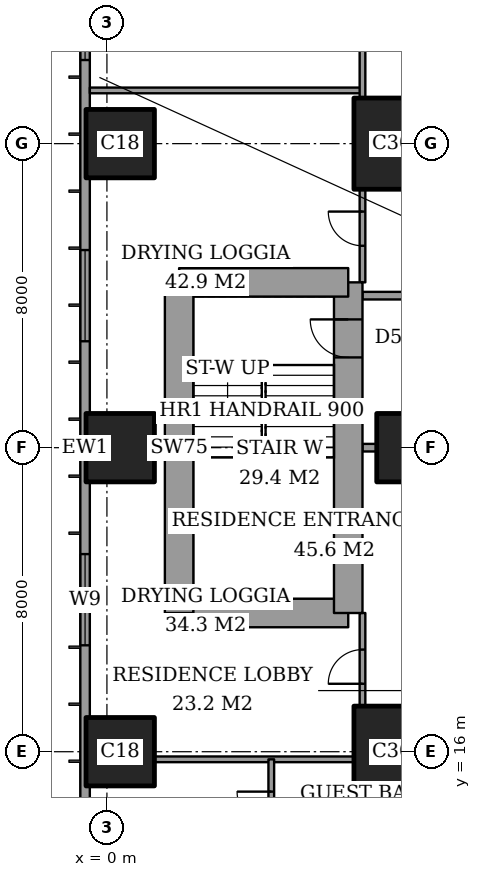
"""IFC4 building model, lengths in metres.
Left out: names, types, materials, properties, quantities, classifications, styles, units other than length and angle.
Written with IfcOpenShell. Run it as: python <this file> out.ifc"""

import sys

from ifc_helpers import new_model, si_unit, direction, frame, frame_2d, origin, origin_2d, place, context, subcontext, project, spatial, rectangle, extrude, element, fill, save


model = new_model("IFC4")
c1 = context("Model", 3, precision=1e-05, world=origin(), true_north=direction((0.0, 1.0)))
c2 = subcontext(c1, "Body", "Model", "MODEL_VIEW")
j1 = project(units=[si_unit("LENGTHUNIT", "METRE"), si_unit("PLANEANGLEUNIT", "RADIAN")], contexts=[c1])
p1 = place(None, origin())
s1 = spatial("IfcSite", under=j1, at=p1, CompositionType="ELEMENT")
p2 = place(p1, origin())
s2 = spatial("IfcBuilding", under=s1, at=p2, CompositionType="ELEMENT")
p3 = place(p2, frame((0.0, 0.0, 211.0)))
s3 = spatial("IfcBuildingStorey", under=s2, at=p3, CompositionType="ELEMENT", Elevation=211.0)
for number, where, z_axis, x_axis in (
    (1, (0.35, 16.0, 0.0), (0.0, 0.0, 1.0), (1.0, 0.0, 0.0)),
    (2, (0.35, 24.0, 0.0), (0.0, 0.0, 1.0), (1.0, 0.0, 0.0)),
    (3, (0.35, 32.0, 0.0), (0.0, 0.0, 1.0), (1.0, 0.0, 0.0)),
):
    element("IfcColumn", number, at=place(p3, frame(where, z_axis=z_axis, x_axis=x_axis)), inside=s3, PredefinedType="COLUMN", context=c2, shape_type="SweptSolid", body=[
        extrude(rectangle(XDim=1.8, YDim=1.8, at=origin_2d()), origin(), (0.0, 0.0, 1.0), 3.6),
    ])
p4 = place(p3, frame((8.0, 16.0, 0.0), z_axis=(0.0, 0.0, 1.0), x_axis=(1.0, 0.0, 0.0)))
e4 = element("IfcColumn", 4, at=p4, inside=s3, PredefinedType="COLUMN", context=c2, shape_type="SweptSolid", body=[
    extrude(rectangle(XDim=3.0, YDim=2.4, at=origin_2d()), origin(), (0.0, 0.0, 1.0), 3.6),
])
p5 = place(p3, frame((8.0, 24.0, 0.0), z_axis=(0.0, 0.0, 1.0), x_axis=(1.0, 0.0, 0.0)))
e5 = element("IfcColumn", 5, at=p5, inside=s3, PredefinedType="COLUMN", context=c2, shape_type="SweptSolid", body=[
    extrude(rectangle(XDim=1.8, YDim=1.8, at=origin_2d()), origin(), (0.0, 0.0, 1.0), 3.6),
])
p6 = place(p3, frame((8.0, 32.0, 0.0), z_axis=(0.0, 0.0, 1.0), x_axis=(1.0, 0.0, 0.0)))
e6 = element("IfcColumn", 6, at=p6, inside=s3, PredefinedType="COLUMN", context=c2, shape_type="SweptSolid", body=[
    extrude(rectangle(XDim=3.0, YDim=2.4, at=origin_2d()), origin(), (0.0, 0.0, 1.0), 3.6),
])
p7 = place(p3, frame((1.9, 19.65, 0.0), z_axis=(0.0, 0.0, 1.0), x_axis=(1.0, 0.0, 0.0)))
e7 = element("IfcWall", 7, at=p7, inside=s3, PredefinedType="SHEAR", context=c2, shape_type="SweptSolid", body=[
    extrude(rectangle(XDim=4.45, YDim=0.75, at=frame_2d((2.225, 0.0))), origin(), (0.0, 0.0, 1.0), 3.6),
])
p8 = place(p3, frame((6.35, 19.65, 0.0), z_axis=(0.0, 0.0, 1.0), x_axis=(0.0, 1.0, 0.0)))
e8 = element("IfcWall", 8, at=p8, inside=s3, PredefinedType="SHEAR", context=c2, shape_type="SweptSolid", body=[
    extrude(rectangle(XDim=8.7, YDim=0.75, at=frame_2d((4.35, 0.0))), origin(), (0.0, 0.0, 1.0), 3.6),
])
p9 = place(p8, frame((6.725, 0.0, 0.0)))
e9 = element("IfcOpeningElement", 9, at=p9, cuts=e8, PredefinedType="OPENING", context=c2, shape_type="SweptSolid", body=[
    extrude(rectangle(XDim=1.0, YDim=2.1, at=frame_2d((0.5, 1.05))), frame((0.0, 0.385, 0.0), z_axis=(0.0, -1.0, 0.0), x_axis=(1.0, 0.0, 0.0)), (0.0, 0.0, 1.0), 0.77),
])
p10 = place(p3, frame((6.35, 28.35, 0.0), z_axis=(0.0, 0.0, 1.0), x_axis=(-1.0, 0.0, 0.0)))
e10 = element("IfcWall", 10, at=p10, inside=s3, PredefinedType="SHEAR", context=c2, shape_type="SweptSolid", body=[
    extrude(rectangle(XDim=4.45, YDim=0.75, at=frame_2d((2.225, 0.0))), origin(), (0.0, 0.0, 1.0), 3.6),
])
p11 = place(p3, frame((1.9, 28.35, 0.0), z_axis=(0.0, 0.0, 1.0), x_axis=(0.0, -1.0, 0.0)))
e11 = element("IfcWall", 11, at=p11, inside=s3, PredefinedType="SHEAR", context=c2, shape_type="SweptSolid", body=[
    extrude(rectangle(XDim=8.7, YDim=0.75, at=frame_2d((4.35, 0.0))), origin(), (0.0, 0.0, 1.0), 3.6),
])
p12 = place(p3, frame((-0.575, 44.825, 0.0), z_axis=(0.0, 0.0, 1.0), x_axis=(0.0, -1.0, 0.0)))
e12 = element("IfcWall", 12, at=p12, inside=s3, PredefinedType="SOLIDWALL", context=c2, shape_type="SweptSolid", body=[
    extrude(rectangle(XDim=41.65, YDim=0.25, at=frame_2d((20.825, 0.0))), origin(), (0.0, 0.0, 1.0), 3.6),
])
p13 = place(p12, frame((0.825, 0.0, 0.2)))
e13 = element("IfcOpeningElement", 13, at=p13, cuts=e12, PredefinedType="OPENING", context=c2, shape_type="SweptSolid", body=[
    extrude(rectangle(XDim=2.4, YDim=2.4, at=frame_2d((1.2, 1.2))), frame((0.0, 0.135, 0.0), z_axis=(0.0, -1.0, 0.0), x_axis=(1.0, 0.0, 0.0)), (0.0, 0.0, 1.0), 0.27),
])
p14 = place(p12, frame((6.05, 0.0, 0.2)))
e14 = element("IfcOpeningElement", 14, at=p14, cuts=e12, PredefinedType="OPENING", context=c2, shape_type="SweptSolid", body=[
    extrude(rectangle(XDim=1.2, YDim=2.4, at=frame_2d((0.6, 1.2))), frame((0.0, 0.135, 0.0), z_axis=(0.0, -1.0, 0.0), x_axis=(1.0, 0.0, 0.0)), (0.0, 0.0, 1.0), 0.27),
])
p15 = place(p12, frame((8.225, 0.0, 0.2)))
e15 = element("IfcOpeningElement", 15, at=p15, cuts=e12, PredefinedType="OPENING", context=c2, shape_type="SweptSolid", body=[
    extrude(rectangle(XDim=2.4, YDim=2.4, at=frame_2d((1.2, 1.2))), frame((0.0, 0.135, 0.0), z_axis=(0.0, -1.0, 0.0), x_axis=(1.0, 0.0, 0.0)), (0.0, 0.0, 1.0), 0.27),
])
p16 = place(p12, frame((15.625, 0.0, 0.2)))
e16 = element("IfcOpeningElement", 16, at=p16, cuts=e12, PredefinedType="OPENING", context=c2, shape_type="SweptSolid", body=[
    extrude(rectangle(XDim=2.4, YDim=2.4, at=frame_2d((1.2, 1.2))), frame((0.0, 0.135, 0.0), z_axis=(0.0, -1.0, 0.0), x_axis=(1.0, 0.0, 0.0)), (0.0, 0.0, 1.0), 0.27),
])
p17 = place(p12, frame((23.625, 0.0, 0.2)))
e17 = element("IfcOpeningElement", 17, at=p17, cuts=e12, PredefinedType="OPENING", context=c2, shape_type="SweptSolid", body=[
    extrude(rectangle(XDim=2.4, YDim=2.4, at=frame_2d((1.2, 1.2))), frame((0.0, 0.135, 0.0), z_axis=(0.0, -1.0, 0.0), x_axis=(1.0, 0.0, 0.0)), (0.0, 0.0, 1.0), 0.27),
])
p18 = place(p12, frame((30.775, 0.0, 0.2)))
e18 = element("IfcOpeningElement", 18, at=p18, cuts=e12, PredefinedType="OPENING", context=c2, shape_type="SweptSolid", body=[
    extrude(rectangle(XDim=2.4, YDim=2.4, at=frame_2d((1.2, 1.2))), frame((0.0, 0.135, 0.0), z_axis=(0.0, -1.0, 0.0), x_axis=(1.0, 0.0, 0.0)), (0.0, 0.0, 1.0), 0.27),
])
p19 = place(p12, frame((34.55, 0.0, 0.2)))
e19 = element("IfcOpeningElement", 19, at=p19, cuts=e12, PredefinedType="OPENING", context=c2, shape_type="SweptSolid", body=[
    extrude(rectangle(XDim=1.2, YDim=2.4, at=frame_2d((0.6, 1.2))), frame((0.0, 0.135, 0.0), z_axis=(0.0, -1.0, 0.0), x_axis=(1.0, 0.0, 0.0)), (0.0, 0.0, 1.0), 0.27),
])
p20 = place(p12, frame((38.425, 0.0, 0.2)))
e20 = element("IfcOpeningElement", 20, at=p20, cuts=e12, PredefinedType="OPENING", context=c2, shape_type="SweptSolid", body=[
    extrude(rectangle(XDim=2.4, YDim=2.4, at=frame_2d((1.2, 1.2))), frame((0.0, 0.135, 0.0), z_axis=(0.0, -1.0, 0.0), x_axis=(1.0, 0.0, 0.0)), (0.0, 0.0, 1.0), 0.27),
])
p21 = place(p3, frame((1.25, 15.8, 0.0), z_axis=(0.0, 0.0, 1.0), x_axis=(1.0, 0.0, 0.0)))
e21 = element("IfcWall", 21, at=p21, inside=s3, PredefinedType="PARTITIONING", context=c2, shape_type="SweptSolid", body=[
    extrude(rectangle(XDim=5.25, YDim=0.15, at=frame_2d((2.625, 0.0))), origin(), (0.0, 0.0, 1.0), 3.35),
])
p22 = place(p3, frame((6.725, 24.0, 0.0), z_axis=(0.0, 0.0, 1.0), x_axis=(1.0, 0.0, 0.0)))
e22 = element("IfcWall", 22, at=p22, inside=s3, PredefinedType="PARTITIONING", context=c2, shape_type="SweptSolid", body=[
    extrude(rectangle(XDim=0.375, YDim=0.2, at=frame_2d((0.188, 0.0))), origin(), (0.0, 0.0, 1.0), 3.35),
])
p23 = place(p3, frame((6.725, 28.0, 0.0), z_axis=(0.0, 0.0, 1.0), x_axis=(1.0, 0.0, 0.0)))
e23 = element("IfcWall", 23, at=p23, inside=s3, PredefinedType="PARTITIONING", context=c2, shape_type="SweptSolid", body=[
    extrude(rectangle(XDim=17.275, YDim=0.2, at=frame_2d((8.637, 0.0))), origin(), (0.0, 0.0, 1.0), 3.35),
])
p24 = place(p23, frame((6.775, 0.0, 0.0)))
e24 = element("IfcOpeningElement", 24, at=p24, cuts=e23, PredefinedType="OPENING", context=c2, shape_type="SweptSolid", body=[
    extrude(rectangle(XDim=1.2, YDim=2.4, at=frame_2d((0.6, 1.2))), frame((0.0, 0.11, 0.0), z_axis=(0.0, -1.0, 0.0), x_axis=(1.0, 0.0, 0.0)), (0.0, 0.0, 1.0), 0.22),
])
p25 = place(p3, frame((-0.45, 33.4, 0.0), z_axis=(0.0, 0.0, 1.0), x_axis=(1.0, 0.0, 0.0)))
e25 = element("IfcWall", 25, at=p25, inside=s3, PredefinedType="PARTITIONING", context=c2, shape_type="SweptSolid", body=[
    extrude(rectangle(XDim=7.175, YDim=0.15, at=frame_2d((3.587, 0.0))), origin(), (0.0, 0.0, 1.0), 3.35),
])
p26 = place(p3, frame((4.325, 13.2, 0.0), z_axis=(0.0, 0.0, 1.0), x_axis=(0.0, 1.0, 0.0)))
e26 = element("IfcWall", 26, at=p26, inside=s3, PredefinedType="PARTITIONING", context=c2, shape_type="SweptSolid", body=[
    extrude(rectangle(XDim=2.6, YDim=0.15, at=frame_2d((1.3, 0.0))), origin(), (0.0, 0.0, 1.0), 3.35),
])
p27 = place(p26, frame((0.85, 0.0, 0.0)))
e27 = element("IfcOpeningElement", 27, at=p27, cuts=e26, PredefinedType="OPENING", context=c2, shape_type="SweptSolid", body=[
    extrude(rectangle(XDim=0.9, YDim=2.1, at=frame_2d((0.45, 1.05))), frame((0.0, 0.085, 0.0), z_axis=(0.0, -1.0, 0.0), x_axis=(1.0, 0.0, 0.0)), (0.0, 0.0, 1.0), 0.17),
])
p28 = place(p3, frame((6.725, 10.6, 0.0), z_axis=(0.0, 0.0, 1.0), x_axis=(0.0, 1.0, 0.0)))
e28 = element("IfcWall", 28, at=p28, inside=s3, PredefinedType="PARTITIONING", context=c2, shape_type="SweptSolid", body=[
    extrude(rectangle(XDim=4.2, YDim=0.15, at=frame_2d((2.1, 0.0))), origin(), (0.0, 0.0, 1.0), 3.35),
])
p29 = place(p3, frame((6.725, 17.2, 0.0), z_axis=(0.0, 0.0, 1.0), x_axis=(0.0, 1.0, 0.0)))
e29 = element("IfcWall", 29, at=p29, inside=s3, PredefinedType="PARTITIONING", context=c2, shape_type="SweptSolid", body=[
    extrude(rectangle(XDim=2.45, YDim=0.15, at=frame_2d((1.225, 0.0))), origin(), (0.0, 0.0, 1.0), 3.35),
])
p30 = place(p29, frame((0.587, 0.0, 0.0)))
e30 = element("IfcOpeningElement", 30, at=p30, cuts=e29, PredefinedType="OPENING", context=c2, shape_type="SweptSolid", body=[
    extrude(rectangle(XDim=0.9, YDim=2.1, at=frame_2d((0.45, 1.05))), frame((0.0, 0.085, 0.0), z_axis=(0.0, -1.0, 0.0), x_axis=(1.0, 0.0, 0.0)), (0.0, 0.0, 1.0), 0.17),
])
p31 = place(p3, frame((6.725, 28.35, 0.0), z_axis=(0.0, 0.0, 1.0), x_axis=(0.0, 1.0, 0.0)))
e31 = element("IfcWall", 31, at=p31, inside=s3, PredefinedType="PARTITIONING", context=c2, shape_type="SweptSolid", body=[
    extrude(rectangle(XDim=2.45, YDim=0.15, at=frame_2d((1.225, 0.0))), origin(), (0.0, 0.0, 1.0), 3.35),
])
p32 = place(p31, frame((0.962, 0.0, 0.0)))
e32 = element("IfcOpeningElement", 32, at=p32, cuts=e31, PredefinedType="OPENING", context=c2, shape_type="SweptSolid", body=[
    extrude(rectangle(XDim=0.9, YDim=2.1, at=frame_2d((0.45, 1.05))), frame((0.0, 0.085, 0.0), z_axis=(0.0, -1.0, 0.0), x_axis=(1.0, 0.0, 0.0)), (0.0, 0.0, 1.0), 0.17),
])
p33 = place(p3, frame((6.725, 33.2, 0.0), z_axis=(0.0, 0.0, 1.0), x_axis=(0.0, 1.0, 0.0)))
e33 = element("IfcWall", 33, at=p33, inside=s3, PredefinedType="PARTITIONING", context=c2, shape_type="SweptSolid", body=[
    extrude(rectangle(XDim=4.2, YDim=0.15, at=frame_2d((2.1, 0.0))), origin(), (0.0, 0.0, 1.0), 3.35),
])
p34 = place(p15, origin())
e34 = element("IfcWindow", 34, at=p34, inside=s3, PartitioningType="SINGLE_PANEL", PredefinedType="WINDOW", context=c2, shape_type="SweptSolid", body=[
    extrude(rectangle(XDim=2.4, YDim=2.4, at=frame_2d((1.2, 1.2))), frame((0.0, 0.03, 0.0), z_axis=(0.0, -1.0, 0.0), x_axis=(1.0, 0.0, 0.0)), (0.0, 0.0, 1.0), 0.06),
])
fill(e15, e34)
p35 = place(p16, origin())
e35 = element("IfcWindow", 35, at=p35, inside=s3, PartitioningType="SINGLE_PANEL", PredefinedType="WINDOW", context=c2, shape_type="SweptSolid", body=[
    extrude(rectangle(XDim=2.4, YDim=2.4, at=frame_2d((1.2, 1.2))), frame((0.0, 0.03, 0.0), z_axis=(0.0, -1.0, 0.0), x_axis=(1.0, 0.0, 0.0)), (0.0, 0.0, 1.0), 0.06),
])
fill(e16, e35)
p36 = place(p17, origin())
e36 = element("IfcWindow", 36, at=p36, inside=s3, PartitioningType="SINGLE_PANEL", PredefinedType="WINDOW", context=c2, shape_type="SweptSolid", body=[
    extrude(rectangle(XDim=2.4, YDim=2.4, at=frame_2d((1.2, 1.2))), frame((0.0, 0.03, 0.0), z_axis=(0.0, -1.0, 0.0), x_axis=(1.0, 0.0, 0.0)), (0.0, 0.0, 1.0), 0.06),
])
fill(e17, e36)
p37 = place(p27, origin())
e37 = element("IfcDoor", 37, at=p37, inside=s3, OperationType="SINGLE_SWING_LEFT", PredefinedType="DOOR", context=c2, shape_type="SweptSolid", body=[
    extrude(rectangle(XDim=0.9, YDim=2.1, at=frame_2d((0.45, 1.05))), frame((0.0, 0.025, 0.0), z_axis=(0.0, -1.0, 0.0), x_axis=(1.0, 0.0, 0.0)), (0.0, 0.0, 1.0), 0.05),
])
fill(e27, e37)
p38 = place(p30, origin())
e38 = element("IfcDoor", 38, at=p38, inside=s3, OperationType="SINGLE_SWING_RIGHT", PredefinedType="DOOR", context=c2, shape_type="SweptSolid", body=[
    extrude(rectangle(XDim=0.9, YDim=2.1, at=frame_2d((0.45, 1.05))), frame((0.0, 0.025, 0.0), z_axis=(0.0, -1.0, 0.0), x_axis=(1.0, 0.0, 0.0)), (0.0, 0.0, 1.0), 0.05),
])
fill(e30, e38)
p39 = place(p32, origin())
e39 = element("IfcDoor", 39, at=p39, inside=s3, OperationType="SINGLE_SWING_LEFT", PredefinedType="DOOR", context=c2, shape_type="SweptSolid", body=[
    extrude(rectangle(XDim=0.9, YDim=2.1, at=frame_2d((0.45, 1.05))), frame((0.0, 0.025, 0.0), z_axis=(0.0, -1.0, 0.0), x_axis=(1.0, 0.0, 0.0)), (0.0, 0.0, 1.0), 0.05),
])
fill(e32, e39)
p40 = place(p9, origin())
e40 = element("IfcDoor", 40, at=p40, inside=s3, OperationType="SINGLE_SWING_LEFT", PredefinedType="DOOR", context=c2, shape_type="SweptSolid", body=[
    extrude(rectangle(XDim=1.0, YDim=2.1, at=frame_2d((0.5, 1.05))), frame((0.0, 0.025, 0.0), z_axis=(0.0, -1.0, 0.0), x_axis=(1.0, 0.0, 0.0)), (0.0, 0.0, 1.0), 0.05),
])
fill(e9, e40)
save(model, sys.argv[1])
